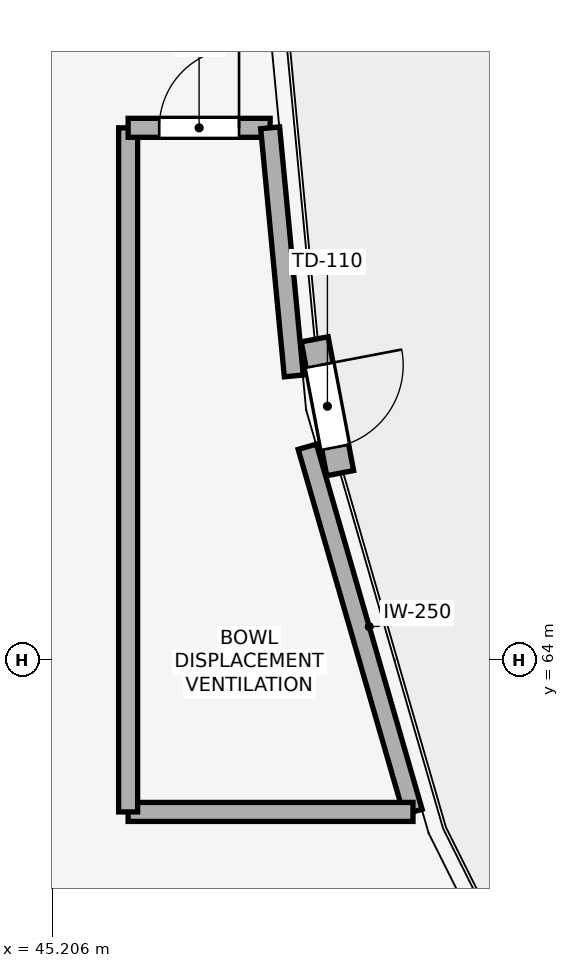
"""IFC4 building model, lengths in metres.
Left out: names, types, materials, properties, quantities, classifications, styles, units other than length and angle.
Written with IfcOpenShell. Run it as: python <this file> out.ifc"""

import sys

from ifc_helpers import new_model, si_unit, direction, frame, frame_2d, origin, place, context, subcontext, project, spatial, rectangle, extrude, element, fill, save


model = new_model("IFC4")
c1 = context("Model", 3, precision=1e-05, world=origin(), true_north=direction((0.0, 1.0)))
c2 = subcontext(c1, "Body", "Model", "MODEL_VIEW")
j1 = project(units=[si_unit("LENGTHUNIT", "METRE"), si_unit("PLANEANGLEUNIT", "RADIAN")], contexts=[c1])
p1 = place(None, origin())
s1 = spatial("IfcSite", under=j1, at=p1, CompositionType="ELEMENT")
p2 = place(p1, origin())
s2 = spatial("IfcBuilding", under=s1, at=p2, CompositionType="ELEMENT")
p3 = place(p2, frame((0.0, 0.0, 24.0)))
s3 = spatial("IfcBuildingStorey", under=s2, at=p3, CompositionType="ELEMENT", Elevation=24.0)
p4 = place(p3, frame((48.654, 68.217, 0.0), z_axis=(0.0, 0.0, 1.0), x_axis=(0.187174705952, -0.982326640915, 0.0)))
e1 = element("IfcWall", 1, at=p4, inside=s3, PredefinedType="STANDARD", context=c2, shape_type="SweptSolid", body=[
    extrude(rectangle(XDim=1.792, YDim=0.36, at=frame_2d((0.896, 0.0))), origin(), (0.0, 0.0, 1.0), 3.38),
])
p5 = place(p4, frame((0.346, 0.0, 0.0)))
e2 = element("IfcOpeningElement", 2, at=p5, cuts=e1, PredefinedType="OPENING", context=c2, shape_type="SweptSolid", body=[
    extrude(rectangle(XDim=1.1, YDim=2.25, at=frame_2d((0.55, 1.125))), frame((0.0, 0.19, 0.0), z_axis=(0.0, -1.0, 0.0), x_axis=(1.0, 0.0, 0.0)), (0.0, 0.0, 1.0), 0.38),
])
p6 = place(p3, frame((48.557, 66.804, 0.0), z_axis=(0.0, 0.0, 1.0), x_axis=(0.277969173727, -0.960589994981, 0.0)))
e3 = element("IfcWall", 3, at=p6, inside=s3, PredefinedType="STANDARD", context=c2, shape_type="SweptSolid", body=[
    extrude(rectangle(XDim=5.001, YDim=0.25, at=frame_2d((2.5, 0.0))), origin(), (0.0, 0.0, 1.0), 3.38),
])
p7 = place(p3, frame((49.948, 62.0, 0.0), z_axis=(0.0, 0.0, 1.0), x_axis=(-1.0, 0.0, 0.0)))
e4 = element("IfcWall", 4, at=p7, inside=s3, PredefinedType="STANDARD", context=c2, shape_type="SweptSolid", body=[
    extrude(rectangle(XDim=3.748, YDim=0.25, at=frame_2d((1.874, 0.0))), origin(), (0.0, 0.0, 1.0), 3.38),
])
p8 = place(p3, frame((46.2, 62.0, 0.0), z_axis=(0.0, 0.0, 1.0), x_axis=(0.0, 1.0, 0.0)))
e5 = element("IfcWall", 5, at=p8, inside=s3, PredefinedType="STANDARD", context=c2, shape_type="SweptSolid", body=[
    extrude(rectangle(XDim=9.0, YDim=0.25, at=frame_2d((4.5, 0.0))), origin(), (0.0, 0.0, 1.0), 3.38),
])
p9 = place(p3, frame((46.2, 71.0, 0.0), z_axis=(0.0, 0.0, 1.0), x_axis=(1.0, 0.0, 0.0)))
e6 = element("IfcWall", 6, at=p9, inside=s3, PredefinedType="STANDARD", context=c2, shape_type="SweptSolid", body=[
    extrude(rectangle(XDim=1.869, YDim=0.25, at=frame_2d((0.934, 0.0))), origin(), (0.0, 0.0, 1.0), 3.38),
])
p10 = place(p9, frame((0.409, 0.0, 0.0)))
e7 = element("IfcOpeningElement", 7, at=p10, cuts=e6, PredefinedType="OPENING", context=c2, shape_type="SweptSolid", body=[
    extrude(rectangle(XDim=1.05, YDim=2.15, at=frame_2d((0.525, 1.075))), frame((0.0, 0.135, 0.0), z_axis=(0.0, -1.0, 0.0), x_axis=(1.0, 0.0, 0.0)), (0.0, 0.0, 1.0), 0.27),
])
p11 = place(p3, frame((48.069, 71.0, 0.0), z_axis=(0.0, 0.0, 1.0), x_axis=(0.094865315901, -0.995490116394, 0.0)))
e8 = element("IfcWall", 8, at=p11, inside=s3, PredefinedType="STANDARD", context=c2, shape_type="SweptSolid", body=[
    extrude(rectangle(XDim=3.279, YDim=0.25, at=frame_2d((1.639, 0.0))), origin(), (0.0, 0.0, 1.0), 3.38),
])
p12 = place(p5, origin())
e9 = element("IfcDoor", 9, at=p12, inside=s3, OperationType="SINGLE_SWING_LEFT", PredefinedType="DOOR", context=c2, shape_type="SweptSolid", body=[
    extrude(rectangle(XDim=1.1, YDim=2.25, at=frame_2d((0.55, 1.125))), frame((0.0, 0.025, 0.0), z_axis=(0.0, -1.0, 0.0), x_axis=(1.0, 0.0, 0.0)), (0.0, 0.0, 1.0), 0.05),
])
fill(e2, e9)
p13 = place(p10, origin())
e10 = element("IfcDoor", 10, at=p13, inside=s3, OperationType="SINGLE_SWING_RIGHT", PredefinedType="DOOR", context=c2, shape_type="SweptSolid", body=[
    extrude(rectangle(XDim=1.05, YDim=2.15, at=frame_2d((0.525, 1.075))), frame((0.0, 0.025, 0.0), z_axis=(0.0, -1.0, 0.0), x_axis=(1.0, 0.0, 0.0)), (0.0, 0.0, 1.0), 0.05),
])
fill(e7, e10)
save(model, sys.argv[1])
